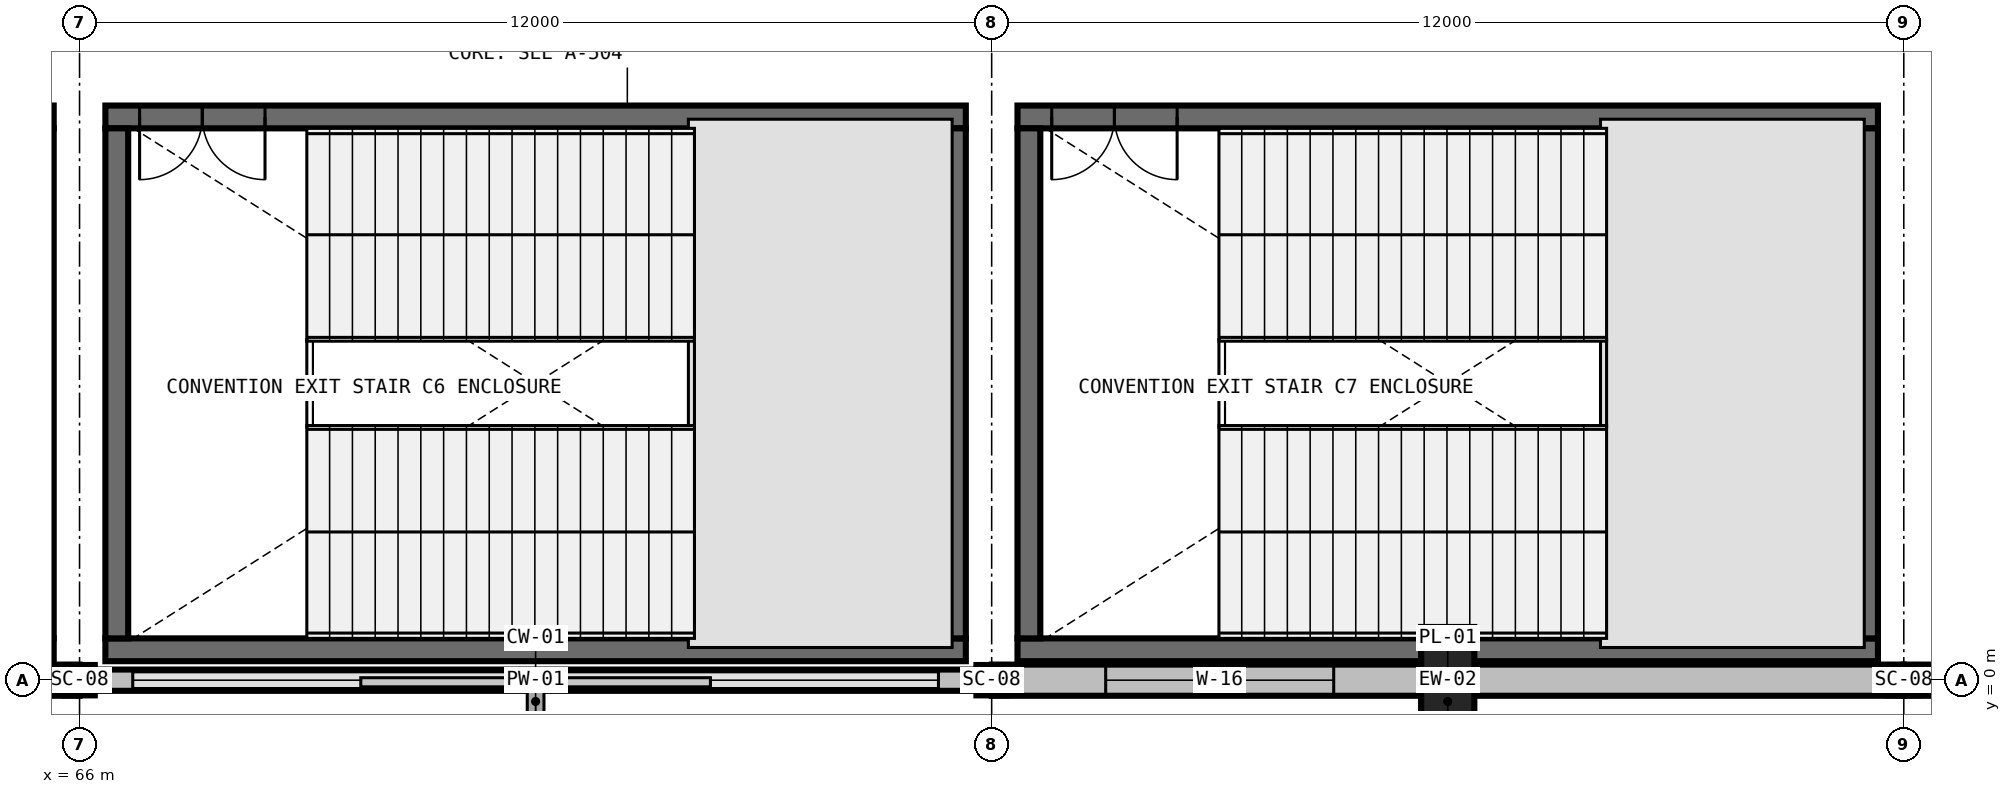
"""IFC4 building model, lengths in metres.
Left out: names, types, materials, properties, quantities, classifications, styles, units other than length and angle.
Written with IfcOpenShell. Run it as: python <this file> out.ifc"""

import sys

from ifc_helpers import new_model, si_unit, direction, frame, frame_2d, origin, origin_2d, place, context, subcontext, project, spatial, rectangle, i_section, extrude, element, fill, save


model = new_model("IFC4")
c1 = context("Model", 3, precision=1e-05, world=origin(), true_north=direction((0.0, 1.0)))
c2 = subcontext(c1, "Body", "Model", "MODEL_VIEW")
j1 = project(units=[si_unit("LENGTHUNIT", "METRE"), si_unit("PLANEANGLEUNIT", "RADIAN")], contexts=[c1])
p1 = place(None, origin())
s1 = spatial("IfcSite", under=j1, at=p1, CompositionType="ELEMENT")
p2 = place(p1, origin())
s2 = spatial("IfcBuilding", under=s1, at=p2, CompositionType="ELEMENT")
p3 = place(p2, frame((0.0, 0.0, 6.0)))
s3 = spatial("IfcBuildingStorey", under=s2, at=p3, CompositionType="ELEMENT", Elevation=6.0)
for number, where, z_axis, x_axis in (
    (1, (66.0, 0.0, 0.0), (0.0, 0.0, 1.0), (1.0, 0.0, 0.0)),
    (2, (78.0, 0.0, 0.0), (0.0, 0.0, 1.0), (1.0, 0.0, 0.0)),
    (3, (90.0, 0.0, 0.0), (0.0, 0.0, 1.0), (1.0, 0.0, 0.0)),
):
    element("IfcColumn", number, at=place(p3, frame(where, z_axis=z_axis, x_axis=x_axis)), inside=s3, PredefinedType="COLUMN", context=c2, shape_type="SweptSolid", body=[
        extrude(i_section(OverallWidth=0.401, OverallDepth=0.399, WebThickness=0.025, FlangeThickness=0.04, FilletRadius=0.031, at=origin_2d()), origin(), (0.0, 0.0, 1.0), 6.0),
    ])
p4 = place(p3, frame((84.0, 0.0, 0.0), z_axis=(0.0, 0.0, 1.0), x_axis=(1.0, 0.0, 0.0)))
e4 = element("IfcColumn", 4, at=p4, inside=s3, PredefinedType="PILASTER", context=c2, shape_type="SweptSolid", body=[
    extrude(rectangle(XDim=0.7, YDim=1.4, at=origin_2d()), origin(), (0.0, 0.0, 1.0), 6.0),
])
p5 = place(p3, frame((65.66, 0.4, 0.0), z_axis=(0.0, 0.0, 1.0), x_axis=(-1.0, 0.0, 0.0)))
e5 = element("IfcWall", 5, at=p5, inside=s3, PredefinedType="SHEAR", context=c2, shape_type="SweptSolid", body=[
    extrude(rectangle(XDim=11.32, YDim=0.3, at=frame_2d((5.66, 0.0))), origin(), (0.0, 0.0, 1.0), 6.0),
])
p6 = place(p3, frame((65.66, 7.41, 0.0), z_axis=(0.0, 0.0, 1.0), x_axis=(-1.0, 0.0, 0.0)))
e6 = element("IfcWall", 6, at=p6, inside=s3, PredefinedType="SHEAR", context=c2, shape_type="SweptSolid", body=[
    extrude(rectangle(XDim=11.32, YDim=0.3, at=frame_2d((5.66, 0.0))), origin(), (0.0, 0.0, 1.0), 6.0),
])
p7 = place(p6, frame((9.22, 0.0, 0.0)))
e7 = element("IfcOpeningElement", 7, at=p7, cuts=e6, PredefinedType="OPENING", context=c2, shape_type="SweptSolid", body=[
    extrude(rectangle(XDim=1.65, YDim=2.25, at=frame_2d((0.825, 1.125))), frame((0.0, 0.165, 0.0), z_axis=(0.0, -1.0, 0.0), x_axis=(1.0, 0.0, 0.0)), (0.0, 0.0, 1.0), 0.33),
])
p8 = place(p3, frame((65.51, 0.55, 0.0), z_axis=(0.0, 0.0, 1.0), x_axis=(0.0, 1.0, 0.0)))
e8 = element("IfcWall", 8, at=p8, inside=s3, PredefinedType="SHEAR", context=c2, shape_type="SweptSolid", body=[
    extrude(rectangle(XDim=6.71, YDim=0.3, at=frame_2d((3.355, 0.0))), origin(), (0.0, 0.0, 1.0), 6.0),
])
p9 = place(p3, frame((77.66, 0.4, 0.0), z_axis=(0.0, 0.0, 1.0), x_axis=(-1.0, 0.0, 0.0)))
e9 = element("IfcWall", 9, at=p9, inside=s3, PredefinedType="SHEAR", context=c2, shape_type="SweptSolid", body=[
    extrude(rectangle(XDim=11.32, YDim=0.3, at=frame_2d((5.66, 0.0))), origin(), (0.0, 0.0, 1.0), 6.0),
])
p10 = place(p3, frame((77.66, 7.41, 0.0), z_axis=(0.0, 0.0, 1.0), x_axis=(-1.0, 0.0, 0.0)))
e10 = element("IfcWall", 10, at=p10, inside=s3, PredefinedType="SHEAR", context=c2, shape_type="SweptSolid", body=[
    extrude(rectangle(XDim=11.32, YDim=0.3, at=frame_2d((5.66, 0.0))), origin(), (0.0, 0.0, 1.0), 6.0),
])
p11 = place(p10, frame((9.22, 0.0, 0.0)))
e11 = element("IfcOpeningElement", 11, at=p11, cuts=e10, PredefinedType="OPENING", context=c2, shape_type="SweptSolid", body=[
    extrude(rectangle(XDim=1.65, YDim=2.25, at=frame_2d((0.825, 1.125))), frame((0.0, 0.165, 0.0), z_axis=(0.0, -1.0, 0.0), x_axis=(1.0, 0.0, 0.0)), (0.0, 0.0, 1.0), 0.33),
])
for number, where, z_axis, x_axis in (
    (12, (66.49, 7.26, 0.0), (0.0, 0.0, 1.0), (0.0, -1.0, 0.0)),
    (13, (77.51, 0.55, 0.0), (0.0, 0.0, 1.0), (0.0, 1.0, 0.0)),
):
    element("IfcWall", number, at=place(p3, frame(where, z_axis=z_axis, x_axis=x_axis)), inside=s3, PredefinedType="SHEAR", context=c2, shape_type="SweptSolid", body=[
        extrude(rectangle(XDim=6.71, YDim=0.3, at=frame_2d((3.355, 0.0))), origin(), (0.0, 0.0, 1.0), 6.0),
    ])
p12 = place(p3, frame((89.66, 0.4, 0.0), z_axis=(0.0, 0.0, 1.0), x_axis=(-1.0, 0.0, 0.0)))
e14 = element("IfcWall", 14, at=p12, inside=s3, PredefinedType="SHEAR", context=c2, shape_type="SweptSolid", body=[
    extrude(rectangle(XDim=11.32, YDim=0.3, at=frame_2d((5.66, 0.0))), origin(), (0.0, 0.0, 1.0), 6.0),
])
p13 = place(p3, frame((89.66, 7.41, 0.0), z_axis=(0.0, 0.0, 1.0), x_axis=(-1.0, 0.0, 0.0)))
e15 = element("IfcWall", 15, at=p13, inside=s3, PredefinedType="SHEAR", context=c2, shape_type="SweptSolid", body=[
    extrude(rectangle(XDim=11.32, YDim=0.3, at=frame_2d((5.66, 0.0))), origin(), (0.0, 0.0, 1.0), 6.0),
])
p14 = place(p13, frame((9.22, 0.0, 0.0)))
e16 = element("IfcOpeningElement", 16, at=p14, cuts=e15, PredefinedType="OPENING", context=c2, shape_type="SweptSolid", body=[
    extrude(rectangle(XDim=1.65, YDim=2.25, at=frame_2d((0.825, 1.125))), frame((0.0, 0.165, 0.0), z_axis=(0.0, -1.0, 0.0), x_axis=(1.0, 0.0, 0.0)), (0.0, 0.0, 1.0), 0.33),
])
for number, where, z_axis, x_axis in (
    (17, (78.49, 7.26, 0.0), (0.0, 0.0, 1.0), (0.0, -1.0, 0.0)),
    (18, (89.51, 0.55, 0.0), (0.0, 0.0, 1.0), (0.0, 1.0, 0.0)),
):
    element("IfcWall", number, at=place(p3, frame(where, z_axis=z_axis, x_axis=x_axis)), inside=s3, PredefinedType="SHEAR", context=c2, shape_type="SweptSolid", body=[
        extrude(rectangle(XDim=6.71, YDim=0.3, at=frame_2d((3.355, 0.0))), origin(), (0.0, 0.0, 1.0), 6.0),
    ])
p15 = place(p3, frame((54.0, 0.0, 0.0), z_axis=(0.0, 0.0, 1.0), x_axis=(1.0, 0.0, 0.0)))
e19 = element("IfcWall", 19, at=p15, inside=s3, PredefinedType="STANDARD", context=c2, shape_type="SweptSolid", body=[
    extrude(rectangle(XDim=12.0, YDim=0.41, at=frame_2d((6.0, 0.0))), origin(), (0.0, 0.0, 1.0), 4.676),
])
p16 = place(p15, frame((1.5, 0.0, 0.85)))
e20 = element("IfcOpeningElement", 20, at=p16, cuts=e19, PredefinedType="OPENING", context=c2, shape_type="SweptSolid", body=[
    extrude(rectangle(XDim=2.2, YDim=1.95, at=frame_2d((1.1, 0.975))), frame((0.0, 0.22, 0.0), z_axis=(0.0, -1.0, 0.0), x_axis=(1.0, 0.0, 0.0)), (0.0, 0.0, 1.0), 0.44),
])
p17 = place(p3, frame((66.0, 0.0, 0.0), z_axis=(0.0, 0.0, 1.0), x_axis=(1.0, 0.0, 0.0)))
e21 = element("IfcWall", 21, at=p17, inside=s3, PredefinedType="PARAPET", context=c2, shape_type="SweptSolid", body=[
    extrude(rectangle(XDim=12.0, YDim=0.28, at=frame_2d((6.0, 0.0))), origin(), (0.0, 0.0, 1.0), 0.2),
])
p18 = place(p3, frame((78.0, 0.0, 0.0), z_axis=(0.0, 0.0, 1.0), x_axis=(1.0, 0.0, 0.0)))
e22 = element("IfcWall", 22, at=p18, inside=s3, PredefinedType="STANDARD", context=c2, shape_type="SweptSolid", body=[
    extrude(rectangle(XDim=12.0, YDim=0.41, at=frame_2d((6.0, 0.0))), origin(), (0.0, 0.0, 1.0), 4.676),
])
p19 = place(p18, frame((1.5, 0.0, 0.85)))
e23 = element("IfcOpeningElement", 23, at=p19, cuts=e22, PredefinedType="OPENING", context=c2, shape_type="SweptSolid", body=[
    extrude(rectangle(XDim=3.0, YDim=2.3, at=frame_2d((1.5, 1.15))), frame((0.0, 0.22, 0.0), z_axis=(0.0, -1.0, 0.0), x_axis=(1.0, 0.0, 0.0)), (0.0, 0.0, 1.0), 0.44),
])
p20 = place(p3, frame((90.0, 0.0, 0.0), z_axis=(0.0, 0.0, 1.0), x_axis=(1.0, 0.0, 0.0)))
e24 = element("IfcWall", 24, at=p20, inside=s3, PredefinedType="STANDARD", context=c2, shape_type="SweptSolid", body=[
    extrude(rectangle(XDim=6.0, YDim=0.41, at=frame_2d((3.0, 0.0))), origin(), (0.0, 0.0, 1.0), 4.676),
])
p21 = place(p11, origin())
e25 = element("IfcDoor", 25, at=p21, inside=s3, OperationType="DOUBLE_DOOR_SINGLE_SWING", PredefinedType="DOOR", context=c2, shape_type="SweptSolid", body=[
    extrude(rectangle(XDim=1.65, YDim=2.25, at=frame_2d((0.825, 1.125))), frame((0.0, 0.025, 0.0), z_axis=(0.0, -1.0, 0.0), x_axis=(1.0, 0.0, 0.0)), (0.0, 0.0, 1.0), 0.05),
])
fill(e11, e25)
p22 = place(p14, origin())
e26 = element("IfcDoor", 26, at=p22, inside=s3, OperationType="DOUBLE_DOOR_SINGLE_SWING", PredefinedType="DOOR", context=c2, shape_type="SweptSolid", body=[
    extrude(rectangle(XDim=1.65, YDim=2.25, at=frame_2d((0.825, 1.125))), frame((0.0, 0.025, 0.0), z_axis=(0.0, -1.0, 0.0), x_axis=(1.0, 0.0, 0.0)), (0.0, 0.0, 1.0), 0.05),
])
fill(e16, e26)
p23 = place(p19, origin())
e27 = element("IfcWindow", 27, at=p23, inside=s3, PartitioningType="TRIPLE_PANEL_VERTICAL", PredefinedType="WINDOW", context=c2, shape_type="SweptSolid", body=[
    extrude(rectangle(XDim=3.0, YDim=2.3, at=frame_2d((1.5, 1.15))), frame((0.0, 0.03, 0.0), z_axis=(0.0, -1.0, 0.0), x_axis=(1.0, 0.0, 0.0)), (0.0, 0.0, 1.0), 0.06),
])
fill(e23, e27)
save(model, sys.argv[1])
